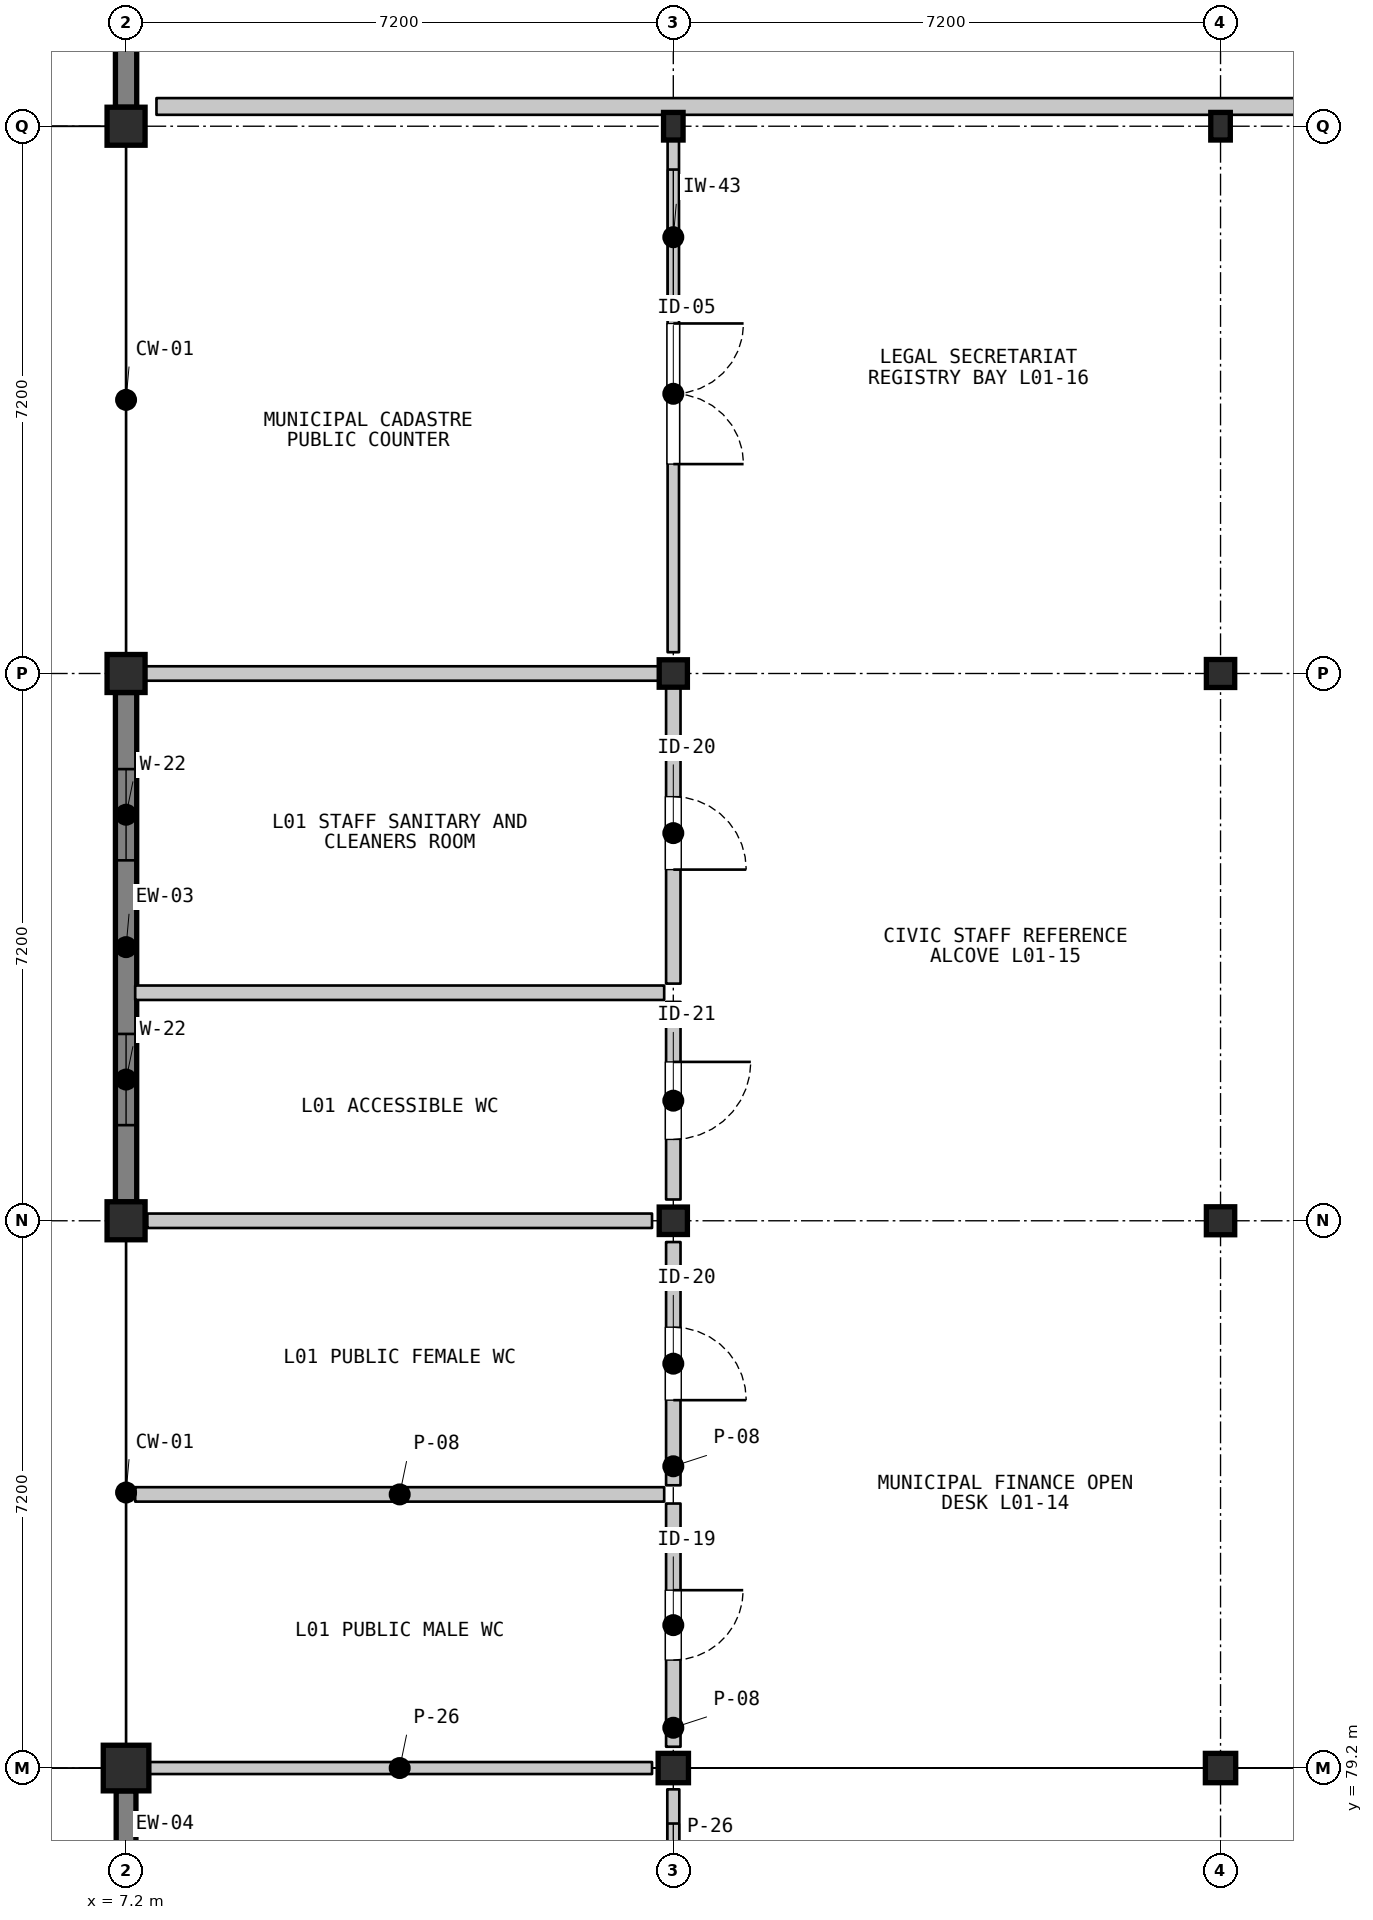
"""IFC4 building model, lengths in metres.
Left out: names, types, materials, properties, quantities, classifications, styles, units other than length and angle.
Written with IfcOpenShell. Run it as: python <this file> out.ifc"""

import sys

from ifc_helpers import new_model, si_unit, direction, frame, frame_2d, origin, origin_2d, place, context, subcontext, project, spatial, rectangle, i_section, extrude, element, fill, save


model = new_model("IFC4")
c1 = context("Model", 3, precision=1e-05, world=origin(), true_north=direction((0.0, 1.0)))
c2 = subcontext(c1, "Body", "Model", "MODEL_VIEW")
j1 = project(units=[si_unit("LENGTHUNIT", "METRE"), si_unit("PLANEANGLEUNIT", "RADIAN")], contexts=[c1])
p1 = place(None, origin())
s1 = spatial("IfcSite", under=j1, at=p1, CompositionType="ELEMENT")
p2 = place(p1, origin())
s2 = spatial("IfcBuilding", under=s1, at=p2, CompositionType="ELEMENT")
p3 = place(p2, origin())
s3 = spatial("IfcBuildingStorey", under=s2, at=p3, CompositionType="ELEMENT", Elevation=0.0)
p4 = place(p3, frame((7.2, 79.2, 0.0), z_axis=(0.0, 0.0, 1.0), x_axis=(1.0, 0.0, 0.0)))
e1 = element("IfcColumn", 1, at=p4, inside=s3, PredefinedType="COLUMN", context=c2, shape_type="SweptSolid", body=[
    extrude(rectangle(XDim=0.6, YDim=0.6, at=origin_2d()), origin(), (0.0, 0.0, 1.0), 5.4),
])
for number, where, z_axis, x_axis in (
    (2, (7.2, 86.4, 0.0), (0.0, 0.0, 1.0), (1.0, 0.0, 0.0)),
    (3, (7.2, 93.6, 0.0), (0.0, 0.0, 1.0), (1.0, 0.0, 0.0)),
    (4, (7.2, 100.8, 0.0), (0.0, 0.0, 1.0), (1.0, 0.0, 0.0)),
):
    element("IfcColumn", number, at=place(p3, frame(where, z_axis=z_axis, x_axis=x_axis)), inside=s3, PredefinedType="COLUMN", context=c2, shape_type="SweptSolid", body=[
        extrude(rectangle(XDim=0.5, YDim=0.5, at=origin_2d()), origin(), (0.0, 0.0, 1.0), 5.4),
    ])
p5 = place(p3, frame((14.4, 79.2, 0.0), z_axis=(0.0, 0.0, 1.0), x_axis=(1.0, 0.0, 0.0)))
e5 = element("IfcColumn", 5, at=p5, inside=s3, PredefinedType="COLUMN", context=c2, shape_type="SweptSolid", body=[
    extrude(i_section(OverallWidth=0.399, OverallDepth=0.386, WebThickness=0.021, FlangeThickness=0.033, FilletRadius=0.015, at=origin_2d()), origin(), (0.0, 0.0, 1.0), 5.4),
])
for number, where, z_axis, x_axis in (
    (6, (14.4, 86.4, 0.0), (0.0, 0.0, 1.0), (1.0, 0.0, 0.0)),
    (7, (14.4, 93.6, 0.0), (0.0, 0.0, 1.0), (1.0, 0.0, 0.0)),
):
    element("IfcColumn", number, at=place(p3, frame(where, z_axis=z_axis, x_axis=x_axis)), inside=s3, PredefinedType="COLUMN", context=c2, shape_type="SweptSolid", body=[
        extrude(i_section(OverallWidth=0.371, OverallDepth=0.361, WebThickness=0.012, FlangeThickness=0.02, FilletRadius=0.015, at=origin_2d()), origin(), (0.0, 0.0, 1.0), 5.4),
    ])
p6 = place(p3, frame((14.4, 100.8, 0.0), z_axis=(0.0, 0.0, 1.0), x_axis=(1.0, 0.0, 0.0)))
e8 = element("IfcColumn", 8, at=p6, inside=s3, PredefinedType="COLUMN", context=c2, shape_type="SweptSolid", body=[
    extrude(i_section(OverallWidth=0.257, OverallDepth=0.363, WebThickness=0.013, FlangeThickness=0.022, FilletRadius=0.015, at=origin_2d()), origin(), (0.0, 0.0, 1.0), 5.4),
])
p7 = place(p3, frame((21.6, 79.2, 0.0), z_axis=(0.0, 0.0, 1.0), x_axis=(1.0, 0.0, 0.0)))
e9 = element("IfcColumn", 9, at=p7, inside=s3, PredefinedType="COLUMN", context=c2, shape_type="SweptSolid", body=[
    extrude(i_section(OverallWidth=0.399, OverallDepth=0.386, WebThickness=0.021, FlangeThickness=0.033, FilletRadius=0.015, at=origin_2d()), origin(), (0.0, 0.0, 1.0), 5.4),
])
for number, where, z_axis, x_axis in (
    (10, (21.6, 86.4, 0.0), (0.0, 0.0, 1.0), (1.0, 0.0, 0.0)),
    (11, (21.6, 93.6, 0.0), (0.0, 0.0, 1.0), (1.0, 0.0, 0.0)),
):
    element("IfcColumn", number, at=place(p3, frame(where, z_axis=z_axis, x_axis=x_axis)), inside=s3, PredefinedType="COLUMN", context=c2, shape_type="SweptSolid", body=[
        extrude(i_section(OverallWidth=0.373, OverallDepth=0.368, WebThickness=0.015, FlangeThickness=0.024, FilletRadius=0.015, at=origin_2d()), origin(), (0.0, 0.0, 1.0), 5.4),
    ])
p8 = place(p3, frame((21.6, 100.8, 0.0), z_axis=(0.0, 0.0, 1.0), x_axis=(1.0, 0.0, 0.0)))
e12 = element("IfcColumn", 12, at=p8, inside=s3, PredefinedType="COLUMN", context=c2, shape_type="SweptSolid", body=[
    extrude(i_section(OverallWidth=0.257, OverallDepth=0.363, WebThickness=0.013, FlangeThickness=0.022, FilletRadius=0.015, at=origin_2d()), origin(), (0.0, 0.0, 1.0), 5.4),
])
p9 = place(p3, frame((7.2, 72.3, 0.0), z_axis=(0.0, 0.0, 1.0), x_axis=(0.0, 1.0, 0.0)))
e13 = element("IfcWall", 13, at=p9, inside=s3, PredefinedType="SOLIDWALL", context=c2, shape_type="SweptSolid", body=[
    extrude(rectangle(XDim=6.6, YDim=0.26, at=frame_2d((3.3, 0.0))), origin(), (0.0, 0.0, 1.0), 4.667),
])
p10 = place(p9, frame((1.4, 0.0, 0.0)))
e14 = element("IfcOpeningElement", 14, at=p10, cuts=e13, PredefinedType="OPENING", context=c2, shape_type="SweptSolid", body=[
    extrude(rectangle(XDim=3.8, YDim=2.95, at=frame_2d((1.9, 1.475))), frame((0.0, 0.14, 0.0), z_axis=(0.0, -1.0, 0.0), x_axis=(1.0, 0.0, 0.0)), (0.0, 0.0, 1.0), 0.28),
])
p11 = place(p3, frame((7.2, 86.65, 0.0), z_axis=(0.0, 0.0, 1.0), x_axis=(0.0, 1.0, 0.0)))
e15 = element("IfcWall", 15, at=p11, inside=s3, PredefinedType="SOLIDWALL", context=c2, shape_type="SweptSolid", body=[
    extrude(rectangle(XDim=6.7, YDim=0.28, at=frame_2d((3.35, 0.0))), origin(), (0.0, 0.0, 1.0), 4.667),
])
p12 = place(p11, frame((1.008, 0.0, 0.95)))
e16 = element("IfcOpeningElement", 16, at=p12, cuts=e15, PredefinedType="OPENING", context=c2, shape_type="SweptSolid", body=[
    extrude(rectangle(XDim=1.2, YDim=1.7, at=frame_2d((0.6, 0.85))), frame((0.0, 0.15, 0.0), z_axis=(0.0, -1.0, 0.0), x_axis=(1.0, 0.0, 0.0)), (0.0, 0.0, 1.0), 0.3),
])
p13 = place(p11, frame((4.492, 0.0, 0.95)))
e17 = element("IfcOpeningElement", 17, at=p13, cuts=e15, PredefinedType="OPENING", context=c2, shape_type="SweptSolid", body=[
    extrude(rectangle(XDim=1.2, YDim=1.7, at=frame_2d((0.6, 0.85))), frame((0.0, 0.15, 0.0), z_axis=(0.0, -1.0, 0.0), x_axis=(1.0, 0.0, 0.0)), (0.0, 0.0, 1.0), 0.3),
])
p14 = place(p3, frame((7.2, 101.05, 0.0), z_axis=(0.0, 0.0, 1.0), x_axis=(0.0, 1.0, 0.0)))
e18 = element("IfcWall", 18, at=p14, inside=s3, PredefinedType="SOLIDWALL", context=c2, shape_type="SweptSolid", body=[
    extrude(rectangle(XDim=6.7, YDim=0.28, at=frame_2d((3.35, 0.0))), origin(), (0.0, 0.0, 1.0), 4.667),
])
p15 = place(p14, frame((0.75, 0.0, 0.0)))
e19 = element("IfcOpeningElement", 19, at=p15, cuts=e18, PredefinedType="OPENING", context=c2, shape_type="SweptSolid", body=[
    extrude(rectangle(XDim=5.2, YDim=2.95, at=frame_2d((2.6, 1.475))), frame((0.0, 0.15, 0.0), z_axis=(0.0, -1.0, 0.0), x_axis=(1.0, 0.0, 0.0)), (0.0, 0.0, 1.0), 0.3),
])
p16 = place(p3, frame((7.6, 101.06, 0.0), z_axis=(0.0, 0.0, 1.0), x_axis=(1.0, 0.0, 0.0)))
e20 = element("IfcWall", 20, at=p16, inside=s3, PredefinedType="PARAPET", context=c2, shape_type="SweptSolid", body=[
    extrude(rectangle(XDim=31.2, YDim=0.22, at=frame_2d((15.6, 0.0))), origin(), (0.0, 0.0, 1.0), 1.15),
])
p17 = place(p3, frame((7.48, 79.2, 0.0), z_axis=(0.0, 0.0, 1.0), x_axis=(1.0, 0.0, 0.0)))
e21 = element("IfcWall", 21, at=p17, inside=s3, PredefinedType="PARTITIONING", context=c2, shape_type="SweptSolid", body=[
    extrude(rectangle(XDim=6.64, YDim=0.158, at=frame_2d((3.32, 0.0))), origin(), (0.0, 0.0, 1.0), 4.588),
])
p18 = place(p3, frame((14.4, 78.92, 0.0), z_axis=(0.0, 0.0, 1.0), x_axis=(0.0, -1.0, 0.0)))
e22 = element("IfcWall", 22, at=p18, inside=s3, PredefinedType="PARTITIONING", context=c2, shape_type="SweptSolid", body=[
    extrude(rectangle(XDim=6.8, YDim=0.158, at=frame_2d((3.4, 0.0))), origin(), (0.0, 0.0, 1.0), 4.588),
])
p19 = place(p18, frame((2.83, 0.0, 0.0)))
e23 = element("IfcOpeningElement", 23, at=p19, cuts=e22, PredefinedType="OPENING", context=c2, shape_type="SweptSolid", body=[
    extrude(rectangle(XDim=1.14, YDim=2.18, at=frame_2d((0.57, 1.09))), frame((0.0, 0.089, 0.0), z_axis=(0.0, -1.0, 0.0), x_axis=(1.0, 0.0, 0.0)), (0.0, 0.0, 1.0), 0.178),
])
p20 = place(p18, frame((0.45, 0.0, 1.05)))
e24 = element("IfcOpeningElement", 24, at=p20, cuts=e22, PredefinedType="OPENING", context=c2, shape_type="SweptSolid", body=[
    extrude(rectangle(XDim=2.0, YDim=1.2, at=frame_2d((1.0, 0.6))), frame((0.0, 0.089, 0.0), z_axis=(0.0, -1.0, 0.0), x_axis=(1.0, 0.0, 0.0)), (0.0, 0.0, 1.0), 0.178),
])
p21 = place(p3, frame((14.4, 82.68, 0.0), z_axis=(0.0, 0.0, 1.0), x_axis=(0.0, -1.0, 0.0)))
e25 = element("IfcWall", 25, at=p21, inside=s3, PredefinedType="PARTITIONING", context=c2, shape_type="SweptSolid", body=[
    extrude(rectangle(XDim=3.2, YDim=0.19, at=frame_2d((1.6, 0.0))), origin(), (0.0, 0.0, 1.0), 4.657),
])
p22 = place(p21, frame((1.14, 0.0, 0.0)))
e26 = element("IfcOpeningElement", 26, at=p22, cuts=e25, PredefinedType="OPENING", context=c2, shape_type="SweptSolid", body=[
    extrude(rectangle(XDim=0.92, YDim=2.1, at=frame_2d((0.46, 1.05))), frame((0.0, 0.105, 0.0), z_axis=(0.0, -1.0, 0.0), x_axis=(1.0, 0.0, 0.0)), (0.0, 0.0, 1.0), 0.21),
])
p23 = place(p3, frame((7.32, 82.8, 0.0), z_axis=(0.0, 0.0, 1.0), x_axis=(1.0, 0.0, 0.0)))
e27 = element("IfcWall", 27, at=p23, inside=s3, PredefinedType="PARTITIONING", context=c2, shape_type="SweptSolid", body=[
    extrude(rectangle(XDim=6.96, YDim=0.19, at=frame_2d((3.48, 0.0))), origin(), (0.0, 0.0, 1.0), 4.657),
])
p24 = place(p3, frame((14.4, 86.12, 0.0), z_axis=(0.0, 0.0, 1.0), x_axis=(0.0, -1.0, 0.0)))
e28 = element("IfcWall", 28, at=p24, inside=s3, PredefinedType="PARTITIONING", context=c2, shape_type="SweptSolid", body=[
    extrude(rectangle(XDim=3.2, YDim=0.19, at=frame_2d((1.6, 0.0))), origin(), (0.0, 0.0, 1.0), 4.657),
])
p25 = place(p24, frame((1.12, 0.0, 0.0)))
e29 = element("IfcOpeningElement", 29, at=p25, cuts=e28, PredefinedType="OPENING", context=c2, shape_type="SweptSolid", body=[
    extrude(rectangle(XDim=0.96, YDim=2.1, at=frame_2d((0.48, 1.05))), frame((0.0, 0.105, 0.0), z_axis=(0.0, -1.0, 0.0), x_axis=(1.0, 0.0, 0.0)), (0.0, 0.0, 1.0), 0.21),
])
p26 = place(p3, frame((7.48, 86.4, 0.0), z_axis=(0.0, 0.0, 1.0), x_axis=(1.0, 0.0, 0.0)))
e30 = element("IfcWall", 30, at=p26, inside=s3, PredefinedType="PARTITIONING", context=c2, shape_type="SweptSolid", body=[
    extrude(rectangle(XDim=6.64, YDim=0.19, at=frame_2d((3.32, 0.0))), origin(), (0.0, 0.0, 1.0), 4.588),
])
p27 = place(p3, frame((14.4, 89.28, 0.0), z_axis=(0.0, 0.0, 1.0), x_axis=(0.0, -1.0, 0.0)))
e31 = element("IfcWall", 31, at=p27, inside=s3, PredefinedType="PARTITIONING", context=c2, shape_type="SweptSolid", body=[
    extrude(rectangle(XDim=2.6, YDim=0.19, at=frame_2d((1.3, 0.0))), origin(), (0.0, 0.0, 1.0), 4.657),
])
p28 = place(p27, frame((0.79, 0.0, 0.0)))
e32 = element("IfcOpeningElement", 32, at=p28, cuts=e31, PredefinedType="OPENING", context=c2, shape_type="SweptSolid", body=[
    extrude(rectangle(XDim=1.02, YDim=2.15, at=frame_2d((0.51, 1.075))), frame((0.0, 0.105, 0.0), z_axis=(0.0, -1.0, 0.0), x_axis=(1.0, 0.0, 0.0)), (0.0, 0.0, 1.0), 0.21),
])
p29 = place(p3, frame((7.32, 89.4, 0.0), z_axis=(0.0, 0.0, 1.0), x_axis=(1.0, 0.0, 0.0)))
e33 = element("IfcWall", 33, at=p29, inside=s3, PredefinedType="PARTITIONING", context=c2, shape_type="SweptSolid", body=[
    extrude(rectangle(XDim=6.96, YDim=0.19, at=frame_2d((3.48, 0.0))), origin(), (0.0, 0.0, 1.0), 4.657),
])
p30 = place(p3, frame((14.4, 93.48, 0.0), z_axis=(0.0, 0.0, 1.0), x_axis=(0.0, -1.0, 0.0)))
e34 = element("IfcWall", 34, at=p30, inside=s3, PredefinedType="PARTITIONING", context=c2, shape_type="SweptSolid", body=[
    extrude(rectangle(XDim=3.96, YDim=0.19, at=frame_2d((1.98, 0.0))), origin(), (0.0, 0.0, 1.0), 4.588),
])
p31 = place(p30, frame((1.5, 0.0, 0.0)))
e35 = element("IfcOpeningElement", 35, at=p31, cuts=e34, PredefinedType="OPENING", context=c2, shape_type="SweptSolid", body=[
    extrude(rectangle(XDim=0.96, YDim=2.1, at=frame_2d((0.48, 1.05))), frame((0.0, 0.105, 0.0), z_axis=(0.0, -1.0, 0.0), x_axis=(1.0, 0.0, 0.0)), (0.0, 0.0, 1.0), 0.21),
])
p32 = place(p3, frame((7.32, 93.6, 0.0), z_axis=(0.0, 0.0, 1.0), x_axis=(1.0, 0.0, 0.0)))
e36 = element("IfcWall", 36, at=p32, inside=s3, PredefinedType="PARTITIONING", context=c2, shape_type="SweptSolid", body=[
    extrude(rectangle(XDim=6.96, YDim=0.19, at=frame_2d((3.48, 0.0))), origin(), (0.0, 0.0, 1.0), 4.588),
])
p33 = place(p3, frame((14.4, 100.68, 0.0), z_axis=(0.0, 0.0, 1.0), x_axis=(0.0, -1.0, 0.0)))
e37 = element("IfcWall", 37, at=p33, inside=s3, PredefinedType="PARTITIONING", context=c2, shape_type="SweptSolid", body=[
    extrude(rectangle(XDim=6.8, YDim=0.15, at=frame_2d((3.4, 0.0))), origin(), (0.0, 0.0, 1.0), 4.588),
])
p34 = place(p33, frame((2.475, 0.0, 0.0)))
e38 = element("IfcOpeningElement", 38, at=p34, cuts=e37, PredefinedType="OPENING", context=c2, shape_type="SweptSolid", body=[
    extrude(rectangle(XDim=1.85, YDim=2.45, at=frame_2d((0.925, 1.225))), frame((0.0, 0.085, 0.0), z_axis=(0.0, -1.0, 0.0), x_axis=(1.0, 0.0, 0.0)), (0.0, 0.0, 1.0), 0.17),
])
p35 = place(p33, frame((0.45, 0.0, 1.05)))
e39 = element("IfcOpeningElement", 39, at=p35, cuts=e37, PredefinedType="OPENING", context=c2, shape_type="SweptSolid", body=[
    extrude(rectangle(XDim=1.78, YDim=1.38, at=frame_2d((0.89, 0.69))), frame((0.0, 0.085, 0.0), z_axis=(0.0, -1.0, 0.0), x_axis=(1.0, 0.0, 0.0)), (0.0, 0.0, 1.0), 0.17),
])
p36 = place(p12, origin())
e40 = element("IfcWindow", 40, at=p36, inside=s3, PartitioningType="SINGLE_PANEL", PredefinedType="WINDOW", context=c2, shape_type="SweptSolid", body=[
    extrude(rectangle(XDim=1.2, YDim=1.7, at=frame_2d((0.6, 0.85))), frame((0.0, 0.03, 0.0), z_axis=(0.0, -1.0, 0.0), x_axis=(1.0, 0.0, 0.0)), (0.0, 0.0, 1.0), 0.06),
])
fill(e16, e40)
p37 = place(p13, origin())
e41 = element("IfcWindow", 41, at=p37, inside=s3, PartitioningType="SINGLE_PANEL", PredefinedType="WINDOW", context=c2, shape_type="SweptSolid", body=[
    extrude(rectangle(XDim=1.2, YDim=1.7, at=frame_2d((0.6, 0.85))), frame((0.0, 0.03, 0.0), z_axis=(0.0, -1.0, 0.0), x_axis=(1.0, 0.0, 0.0)), (0.0, 0.0, 1.0), 0.06),
])
fill(e17, e41)
p38 = place(p20, origin())
e42 = element("IfcWindow", 42, at=p38, inside=s3, PartitioningType="SINGLE_PANEL", PredefinedType="WINDOW", context=c2, shape_type="SweptSolid", body=[
    extrude(rectangle(XDim=2.0, YDim=1.2, at=frame_2d((1.0, 0.6))), frame((0.0, 0.03, 0.0), z_axis=(0.0, -1.0, 0.0), x_axis=(1.0, 0.0, 0.0)), (0.0, 0.0, 1.0), 0.06),
])
fill(e24, e42)
p39 = place(p22, origin())
e43 = element("IfcDoor", 43, at=p39, inside=s3, OperationType="SINGLE_SWING_LEFT", PredefinedType="DOOR", context=c2, shape_type="SweptSolid", body=[
    extrude(rectangle(XDim=0.92, YDim=2.1, at=frame_2d((0.46, 1.05))), frame((0.0, 0.025, 0.0), z_axis=(0.0, -1.0, 0.0), x_axis=(1.0, 0.0, 0.0)), (0.0, 0.0, 1.0), 0.05),
])
fill(e26, e43)
p40 = place(p25, origin())
e44 = element("IfcDoor", 44, at=p40, inside=s3, OperationType="SINGLE_SWING_RIGHT", PredefinedType="DOOR", context=c2, shape_type="SweptSolid", body=[
    extrude(rectangle(XDim=0.96, YDim=2.1, at=frame_2d((0.48, 1.05))), frame((0.0, 0.025, 0.0), z_axis=(0.0, -1.0, 0.0), x_axis=(1.0, 0.0, 0.0)), (0.0, 0.0, 1.0), 0.05),
])
fill(e29, e44)
p41 = place(p28, origin())
e45 = element("IfcDoor", 45, at=p41, inside=s3, OperationType="SINGLE_SWING_LEFT", PredefinedType="DOOR", context=c2, shape_type="SweptSolid", body=[
    extrude(rectangle(XDim=1.02, YDim=2.15, at=frame_2d((0.51, 1.075))), frame((0.0, 0.025, 0.0), z_axis=(0.0, -1.0, 0.0), x_axis=(1.0, 0.0, 0.0)), (0.0, 0.0, 1.0), 0.05),
])
fill(e32, e45)
p42 = place(p31, origin())
e46 = element("IfcDoor", 46, at=p42, inside=s3, OperationType="SINGLE_SWING_RIGHT", PredefinedType="DOOR", context=c2, shape_type="SweptSolid", body=[
    extrude(rectangle(XDim=0.96, YDim=2.1, at=frame_2d((0.48, 1.05))), frame((0.0, 0.025, 0.0), z_axis=(0.0, -1.0, 0.0), x_axis=(1.0, 0.0, 0.0)), (0.0, 0.0, 1.0), 0.05),
])
fill(e35, e46)
p43 = place(p34, origin())
e47 = element("IfcDoor", 47, at=p43, inside=s3, OperationType="DOUBLE_DOOR_SINGLE_SWING", PredefinedType="DOOR", context=c2, shape_type="SweptSolid", body=[
    extrude(rectangle(XDim=1.85, YDim=2.45, at=frame_2d((0.925, 1.225))), frame((0.0, 0.025, 0.0), z_axis=(0.0, -1.0, 0.0), x_axis=(1.0, 0.0, 0.0)), (0.0, 0.0, 1.0), 0.05),
])
fill(e38, e47)
p44 = place(p35, origin())
e48 = element("IfcWindow", 48, at=p44, inside=s3, PartitioningType="SINGLE_PANEL", PredefinedType="WINDOW", context=c2, shape_type="SweptSolid", body=[
    extrude(rectangle(XDim=1.78, YDim=1.38, at=frame_2d((0.89, 0.69))), frame((0.0, 0.03, 0.0), z_axis=(0.0, -1.0, 0.0), x_axis=(1.0, 0.0, 0.0)), (0.0, 0.0, 1.0), 0.06),
])
fill(e39, e48)
save(model, sys.argv[1])
